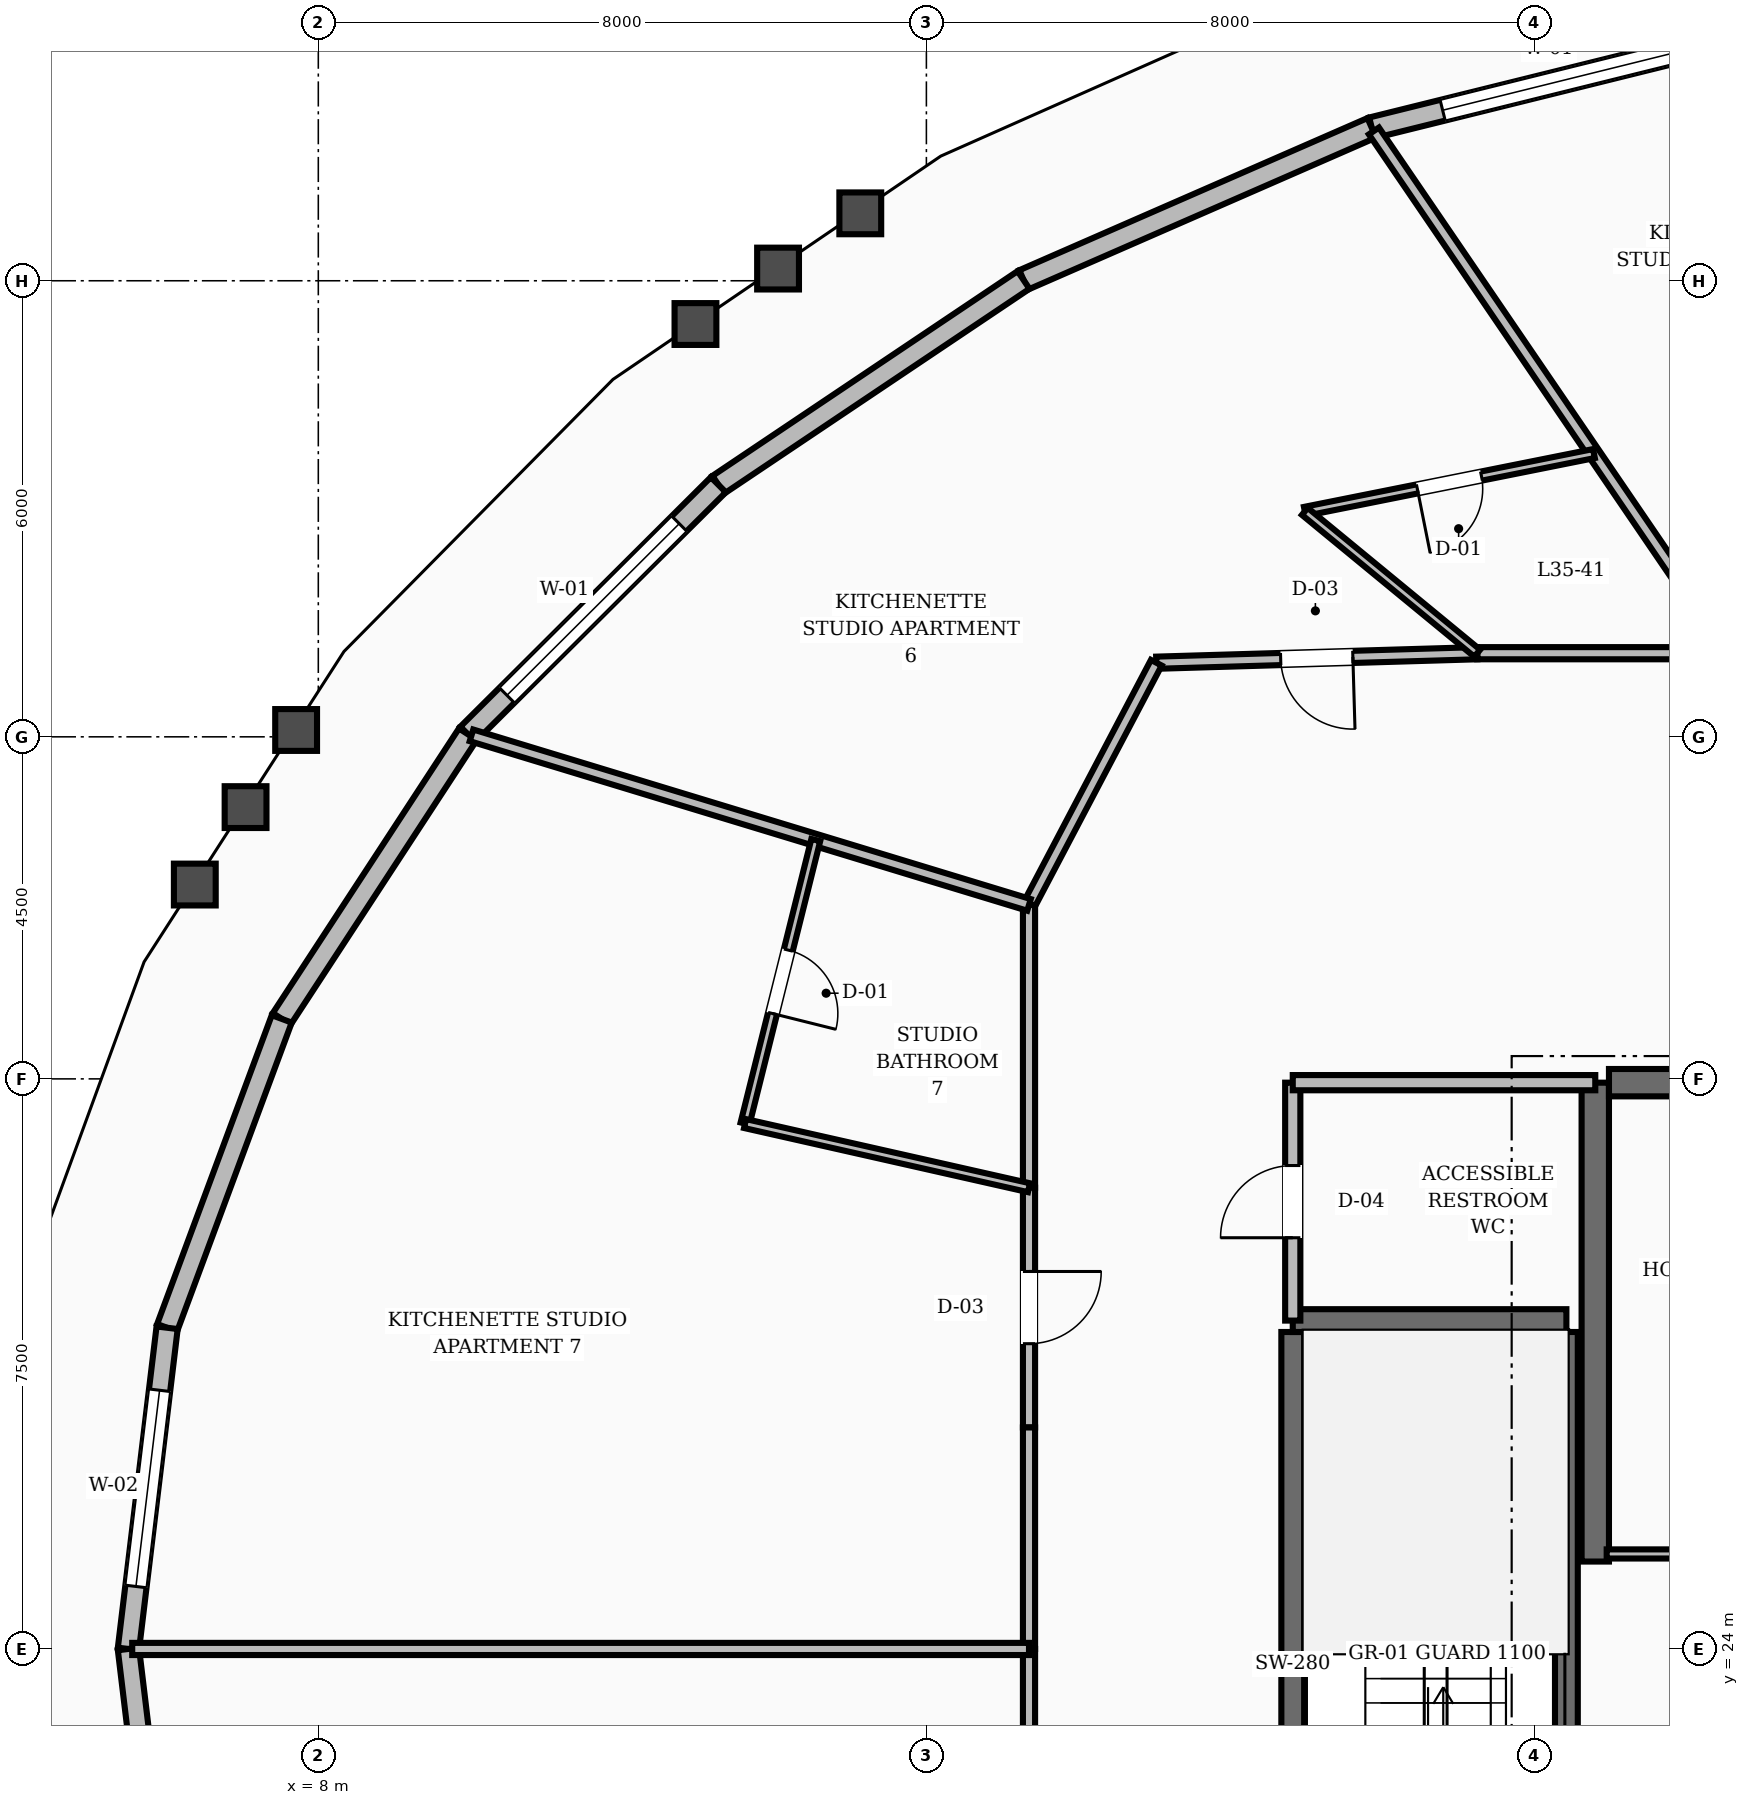
"""IFC4 building model, lengths in metres.
Left out: names, types, materials, properties, quantities, classifications, styles, units other than length and angle.
Written with IfcOpenShell. Run it as: python <this file> out.ifc"""

import sys

from ifc_helpers import new_model, si_unit, direction, frame, frame_2d, origin, place, context, subcontext, project, spatial, rectangle, extrude, element, fill, save


model = new_model("IFC4")
c1 = context("Model", 3, precision=1e-05, world=origin(), true_north=direction((0.0, 1.0)))
c2 = subcontext(c1, "Body", "Model", "MODEL_VIEW")
j1 = project(units=[si_unit("LENGTHUNIT", "METRE"), si_unit("PLANEANGLEUNIT", "RADIAN")], contexts=[c1])
p1 = place(None, origin())
s1 = spatial("IfcSite", under=j1, at=p1, CompositionType="ELEMENT")
p2 = place(p1, origin())
s2 = spatial("IfcBuilding", under=s1, at=p2, CompositionType="ELEMENT")
p3 = place(p2, frame((0.0, 0.0, 138.8)))
s3 = spatial("IfcBuildingStorey", under=s2, at=p3, CompositionType="ELEMENT", Elevation=138.8)
p4 = place(p3, frame((24.8, 25.15, 0.0), z_axis=(0.0, 0.0, 1.0), x_axis=(0.0, 1.0, 0.0)))
e1 = element("IfcWall", 1, at=p4, inside=s3, PredefinedType="SHEAR", context=c2, shape_type="SweptSolid", body=[
    extrude(rectangle(XDim=6.3, YDim=0.36, at=frame_2d((3.15, 0.0))), origin(), (0.0, 0.0, 1.0), 3.6),
])
p5 = place(p3, frame((24.98, 31.45, 0.0), z_axis=(0.0, 0.0, 1.0), x_axis=(1.0, 0.0, 0.0)))
e2 = element("IfcWall", 2, at=p5, inside=s3, PredefinedType="SHEAR", context=c2, shape_type="SweptSolid", body=[
    extrude(rectangle(XDim=3.22, YDim=0.36, at=frame_2d((1.61, 0.0))), origin(), (0.0, 0.0, 1.0), 3.6),
])
for number, where, z_axis, x_axis in (
    (3, (20.82, 19.43, 0.0), (0.0, 0.0, 1.0), (0.0, 1.0, 0.0)),
    (4, (24.42, 19.43, 0.0), (0.0, 0.0, 1.0), (0.0, 1.0, 0.0)),
):
    element("IfcWall", number, at=place(p3, frame(where, z_axis=z_axis, x_axis=x_axis)), inside=s3, PredefinedType="SHEAR", context=c2, shape_type="SweptSolid", body=[
        extrude(rectangle(XDim=8.74, YDim=0.3, at=frame_2d((4.37, 0.0))), origin(), (0.0, 0.0, 1.0), 3.6),
    ])
p6 = place(p3, frame((20.82, 28.32, 0.0), z_axis=(0.0, 0.0, 1.0), x_axis=(1.0, 0.0, 0.0)))
e5 = element("IfcWall", 5, at=p6, inside=s3, PredefinedType="SHEAR", context=c2, shape_type="SweptSolid", body=[
    extrude(rectangle(XDim=3.6, YDim=0.3, at=frame_2d((1.8, 0.0))), origin(), (0.0, 0.0, 1.0), 3.6),
])
p7 = place(p3, frame((26.83, 45.245, 0.0), z_axis=(0.0, 0.0, 1.0), x_axis=(-0.970600650036, -0.240695613066, 0.0)))
e6 = element("IfcWall", 6, at=p7, inside=s3, PredefinedType="STANDARD", context=c2, shape_type="SweptSolid", body=[
    extrude(rectangle(XDim=5.121, YDim=0.28, at=frame_2d((2.561, 0.0))), origin(), (0.0, 0.0, 1.0), 2.82),
])
p8 = place(p7, frame((0.961, 0.0, 0.8)))
e7 = element("IfcOpeningElement", 7, at=p8, cuts=e6, PredefinedType="OPENING", context=c2, shape_type="SweptSolid", body=[
    extrude(rectangle(XDim=3.2, YDim=1.65, at=frame_2d((1.6, 0.825))), frame((0.0, 0.15, 0.0), z_axis=(0.0, -1.0, 0.0), x_axis=(1.0, 0.0, 0.0)), (0.0, 0.0, 1.0), 0.3),
])
p9 = place(p3, frame((21.86, 44.012, 0.0), z_axis=(0.0, 0.0, 1.0), x_axis=(-0.916348879192, -0.400380733307, 0.0)))
e8 = element("IfcWall", 8, at=p9, inside=s3, PredefinedType="STANDARD", context=c2, shape_type="SweptSolid", body=[
    extrude(rectangle(XDim=5.0, YDim=0.28, at=frame_2d((2.5, 0.0))), origin(), (0.0, 0.0, 1.0), 2.82),
])
p10 = place(p3, frame((17.278, 42.01, 0.0), z_axis=(0.0, 0.0, 1.0), x_axis=(-0.830431041812, -0.557121427334, 0.0)))
e9 = element("IfcWall", 9, at=p10, inside=s3, PredefinedType="STANDARD", context=c2, shape_type="SweptSolid", body=[
    extrude(rectangle(XDim=4.835, YDim=0.28, at=frame_2d((2.417, 0.0))), origin(), (0.0, 0.0, 1.0), 2.82),
])
p11 = place(p3, frame((13.263, 39.316, 0.0), z_axis=(0.0, 0.0, 1.0), x_axis=(-0.708522616078, -0.705688105686, 0.0)))
e10 = element("IfcWall", 10, at=p11, inside=s3, PredefinedType="STANDARD", context=c2, shape_type="SweptSolid", body=[
    extrude(rectangle(XDim=4.651, YDim=0.28, at=frame_2d((2.326, 0.0))), origin(), (0.0, 0.0, 1.0), 2.82),
])
p12 = place(p11, frame((0.726, 0.0, 0.8)))
e11 = element("IfcOpeningElement", 11, at=p12, cuts=e10, PredefinedType="OPENING", context=c2, shape_type="SweptSolid", body=[
    extrude(rectangle(XDim=3.2, YDim=1.65, at=frame_2d((1.6, 0.825))), frame((0.0, 0.15, 0.0), z_axis=(0.0, -1.0, 0.0), x_axis=(1.0, 0.0, 0.0)), (0.0, 0.0, 1.0), 0.3),
])
p13 = place(p3, frame((9.968, 36.034, 0.0), z_axis=(0.0, 0.0, 1.0), x_axis=(-0.54727435463, -0.836953272749, 0.0)))
e12 = element("IfcWall", 12, at=p13, inside=s3, PredefinedType="STANDARD", context=c2, shape_type="SweptSolid", body=[
    extrude(rectangle(XDim=4.474, YDim=0.28, at=frame_2d((2.237, 0.0))), origin(), (0.0, 0.0, 1.0), 2.82),
])
p14 = place(p3, frame((7.519, 32.289, 0.0), z_axis=(0.0, 0.0, 1.0), x_axis=(-0.347886684165, -0.937536588609, 0.0)))
e13 = element("IfcWall", 13, at=p14, inside=s3, PredefinedType="STANDARD", context=c2, shape_type="SweptSolid", body=[
    extrude(rectangle(XDim=4.334, YDim=0.28, at=frame_2d((2.167, 0.0))), origin(), (0.0, 0.0, 1.0), 2.82),
])
p15 = place(p3, frame((6.011, 28.226, 0.0), z_axis=(0.0, 0.0, 1.0), x_axis=(-0.119649579006, -0.992816185527, 0.0)))
e14 = element("IfcWall", 14, at=p15, inside=s3, PredefinedType="STANDARD", context=c2, shape_type="SweptSolid", body=[
    extrude(rectangle(XDim=4.256, YDim=0.28, at=frame_2d((2.128, 0.0))), origin(), (0.0, 0.0, 1.0), 2.82),
])
p16 = place(p15, frame((0.828, 0.0, 0.8)))
e15 = element("IfcOpeningElement", 15, at=p16, cuts=e14, PredefinedType="OPENING", context=c2, shape_type="SweptSolid", body=[
    extrude(rectangle(XDim=2.6, YDim=1.65, at=frame_2d((1.3, 0.825))), frame((0.0, 0.15, 0.0), z_axis=(0.0, -1.0, 0.0), x_axis=(1.0, 0.0, 0.0)), (0.0, 0.0, 1.0), 0.3),
])
p17 = place(p3, frame((5.502, 24.0, 0.0), z_axis=(0.0, 0.0, 1.0), x_axis=(0.119649579006, -0.992816185527, 0.0)))
e16 = element("IfcWall", 16, at=p17, inside=s3, PredefinedType="STANDARD", context=c2, shape_type="SweptSolid", body=[
    extrude(rectangle(XDim=4.256, YDim=0.28, at=frame_2d((2.128, 0.0))), origin(), (0.0, 0.0, 1.0), 2.82),
])
p18 = place(p3, frame((20.82, 28.32, 0.0), z_axis=(0.0, 0.0, 1.0), x_axis=(0.0, 1.0, 0.0)))
e17 = element("IfcWall", 17, at=p18, inside=s3, PredefinedType="SOLIDWALL", context=c2, shape_type="SweptSolid", body=[
    extrude(rectangle(XDim=3.13, YDim=0.2, at=frame_2d((1.565, 0.0))), origin(), (0.0, 0.0, 1.0), 2.8),
])
p19 = place(p18, frame((1.09, 0.0, 0.0)))
e18 = element("IfcOpeningElement", 18, at=p19, cuts=e17, PredefinedType="OPENING", context=c2, shape_type="SweptSolid", body=[
    extrude(rectangle(XDim=0.95, YDim=2.1, at=frame_2d((0.475, 1.05))), frame((0.0, 0.11, 0.0), z_axis=(0.0, -1.0, 0.0), x_axis=(1.0, 0.0, 0.0)), (0.0, 0.0, 1.0), 0.22),
])
p20 = place(p3, frame((20.82, 31.45, 0.0), z_axis=(0.0, 0.0, 1.0), x_axis=(1.0, 0.0, 0.0)))
e19 = element("IfcWall", 19, at=p20, inside=s3, PredefinedType="SOLIDWALL", context=c2, shape_type="SweptSolid", body=[
    extrude(rectangle(XDim=3.98, YDim=0.2, at=frame_2d((1.99, 0.0))), origin(), (0.0, 0.0, 1.0), 2.8),
])
p21 = place(p3, frame((24.95, 25.25, 0.0), z_axis=(0.0, 0.0, 1.0), x_axis=(1.0, 0.0, 0.0)))
e20 = element("IfcWall", 20, at=p21, inside=s3, PredefinedType="PARTITIONING", context=c2, shape_type="SweptSolid", body=[
    extrude(rectangle(XDim=3.2, YDim=0.12, at=frame_2d((1.6, 0.0))), origin(), (0.0, 0.0, 1.0), 2.8),
])
p22 = place(p21, frame((1.125, 0.0, 0.0)))
e21 = element("IfcOpeningElement", 21, at=p22, cuts=e20, PredefinedType="OPENING", context=c2, shape_type="SweptSolid", body=[
    extrude(rectangle(XDim=0.95, YDim=2.1, at=frame_2d((0.475, 1.05))), frame((0.0, 0.07, 0.0), z_axis=(0.0, -1.0, 0.0), x_axis=(1.0, 0.0, 0.0)), (0.0, 0.0, 1.0), 0.14),
])
p23 = place(p3, frame((26.574, 37.1, 0.0), z_axis=(0.0, 0.0, 1.0), x_axis=(-1.0, 0.0, 0.0)))
e22 = element("IfcWall", 22, at=p23, inside=s3, PredefinedType="SOLIDWALL", context=c2, shape_type="SweptSolid", body=[
    extrude(rectangle(XDim=3.327, YDim=0.16, at=frame_2d((1.664, 0.0))), origin(), (0.0, 0.0, 1.0), 2.8),
])
p24 = place(p3, frame((23.247, 37.1, 0.0), z_axis=(0.0, 0.0, 1.0), x_axis=(-0.999561990195, -0.029594387265, 0.0)))
e23 = element("IfcWall", 23, at=p24, inside=s3, PredefinedType="SOLIDWALL", context=c2, shape_type="SweptSolid", body=[
    extrude(rectangle(XDim=4.224, YDim=0.16, at=frame_2d((2.112, 0.0))), origin(), (0.0, 0.0, 1.0), 2.8),
])
p25 = place(p24, frame((1.637, 0.0, 0.0)))
e24 = element("IfcOpeningElement", 24, at=p25, cuts=e23, PredefinedType="OPENING", context=c2, shape_type="SweptSolid", body=[
    extrude(rectangle(XDim=0.95, YDim=2.1, at=frame_2d((0.475, 1.05))), frame((0.0, 0.09, 0.0), z_axis=(0.0, -1.0, 0.0), x_axis=(1.0, 0.0, 0.0)), (0.0, 0.0, 1.0), 0.18),
])
p26 = place(p3, frame((19.025, 36.975, 0.0), z_axis=(0.0, 0.0, 1.0), x_axis=(-0.46527115782, -0.885168204185, 0.0)))
e25 = element("IfcWall", 25, at=p26, inside=s3, PredefinedType="SOLIDWALL", context=c2, shape_type="SweptSolid", body=[
    extrude(rectangle(XDim=3.6, YDim=0.16, at=frame_2d((1.8, 0.0))), origin(), (0.0, 0.0, 1.0), 2.8),
])
p27 = place(p3, frame((17.35, 33.789, 0.0), z_axis=(0.0, 0.0, 1.0), x_axis=(0.0, -1.0, 0.0)))
e26 = element("IfcWall", 26, at=p27, inside=s3, PredefinedType="SOLIDWALL", context=c2, shape_type="SweptSolid", body=[
    extrude(rectangle(XDim=3.721, YDim=0.16, at=frame_2d((1.86, 0.0))), origin(), (0.0, 0.0, 1.0), 2.8),
])
p28 = place(p3, frame((17.35, 30.068, 0.0), z_axis=(0.0, 0.0, 1.0), x_axis=(0.0, -1.0, 0.0)))
e27 = element("IfcWall", 27, at=p28, inside=s3, PredefinedType="SOLIDWALL", context=c2, shape_type="SweptSolid", body=[
    extrude(rectangle(XDim=3.154, YDim=0.16, at=frame_2d((1.577, 0.0))), origin(), (0.0, 0.0, 1.0), 2.8),
])
p29 = place(p28, frame((1.102, 0.0, 0.0)))
e28 = element("IfcOpeningElement", 28, at=p29, cuts=e27, PredefinedType="OPENING", context=c2, shape_type="SweptSolid", body=[
    extrude(rectangle(XDim=0.95, YDim=2.1, at=frame_2d((0.475, 1.05))), frame((0.0, 0.09, 0.0), z_axis=(0.0, -1.0, 0.0), x_axis=(1.0, 0.0, 0.0)), (0.0, 0.0, 1.0), 0.18),
])
for number, where, z_axis, x_axis in (
    (29, (17.35, 26.914, 0.0), (0.0, 0.0, 1.0), (0.0, -1.0, 0.0)),
    (30, (17.35, 24.0, 0.0), (0.0, 0.0, 1.0), (0.0, -1.0, 0.0)),
):
    element("IfcWall", number, at=place(p3, frame(where, z_axis=z_axis, x_axis=x_axis)), inside=s3, PredefinedType="SOLIDWALL", context=c2, shape_type="SweptSolid", body=[
        extrude(rectangle(XDim=2.914, YDim=0.16, at=frame_2d((1.457, 0.0))), origin(), (0.0, 0.0, 1.0), 2.8),
    ])
p30 = place(p3, frame((26.574, 37.1, 0.0), z_axis=(0.0, 0.0, 1.0), x_axis=(-0.563462523852, 0.826141624792, 0.0)))
e31 = element("IfcWall", 31, at=p30, inside=s3, PredefinedType="SOLIDWALL", context=c2, shape_type="SweptSolid", body=[
    extrude(rectangle(XDim=8.316, YDim=0.16, at=frame_2d((4.158, 0.0))), origin(), (0.0, 0.0, 1.0), 2.8),
])
p31 = place(p3, frame((24.782, 39.727, 0.0), z_axis=(0.0, 0.0, 1.0), x_axis=(-0.980580675691, -0.196116135138, 0.0)))
e32 = element("IfcWall", 32, at=p31, inside=s3, PredefinedType="PARTITIONING", context=c2, shape_type="SweptSolid", body=[
    extrude(rectangle(XDim=3.879, YDim=0.12, at=frame_2d((1.939, 0.0))), origin(), (0.0, 0.0, 1.0), 2.8),
])
p32 = place(p31, frame((1.51, 0.0, 0.0)))
e33 = element("IfcOpeningElement", 33, at=p32, cuts=e32, PredefinedType="OPENING", context=c2, shape_type="SweptSolid", body=[
    extrude(rectangle(XDim=0.86, YDim=2.1, at=frame_2d((0.43, 1.05))), frame((0.0, 0.07, 0.0), z_axis=(0.0, -1.0, 0.0), x_axis=(1.0, 0.0, 0.0)), (0.0, 0.0, 1.0), 0.14),
])
p33 = place(p3, frame((23.247, 37.1, 0.0), z_axis=(0.0, 0.0, 1.0), x_axis=(-0.772280465458, 0.63528173488, 0.0)))
e34 = element("IfcWall", 34, at=p33, inside=s3, PredefinedType="PARTITIONING", context=c2, shape_type="SweptSolid", body=[
    extrude(rectangle(XDim=2.937, YDim=0.12, at=frame_2d((1.468, 0.0))), origin(), (0.0, 0.0, 1.0), 2.8),
])
p34 = place(p3, frame((17.35, 33.789, 0.0), z_axis=(0.0, 0.0, 1.0), x_axis=(-0.956731712207, 0.290971529289, 0.0)))
e35 = element("IfcWall", 35, at=p34, inside=s3, PredefinedType="SOLIDWALL", context=c2, shape_type="SweptSolid", body=[
    extrude(rectangle(XDim=7.667, YDim=0.16, at=frame_2d((3.833, 0.0))), origin(), (0.0, 0.0, 1.0), 2.8),
])
p35 = place(p3, frame((14.545, 34.642, 0.0), z_axis=(0.0, 0.0, 1.0), x_axis=(-0.242087316969, -0.970254467118, 0.0)))
e36 = element("IfcWall", 36, at=p35, inside=s3, PredefinedType="PARTITIONING", context=c2, shape_type="SweptSolid", body=[
    extrude(rectangle(XDim=3.844, YDim=0.12, at=frame_2d((1.922, 0.0))), origin(), (0.0, 0.0, 1.0), 2.8),
])
p36 = place(p35, frame((1.492, 0.0, 0.0)))
e37 = element("IfcOpeningElement", 37, at=p36, cuts=e36, PredefinedType="OPENING", context=c2, shape_type="SweptSolid", body=[
    extrude(rectangle(XDim=0.86, YDim=2.1, at=frame_2d((0.43, 1.05))), frame((0.0, 0.07, 0.0), z_axis=(0.0, -1.0, 0.0), x_axis=(1.0, 0.0, 0.0)), (0.0, 0.0, 1.0), 0.14),
])
p37 = place(p3, frame((17.35, 30.068, 0.0), z_axis=(0.0, 0.0, 1.0), x_axis=(-0.975420676692, 0.220350864492, 0.0)))
e38 = element("IfcWall", 38, at=p37, inside=s3, PredefinedType="PARTITIONING", context=c2, shape_type="SweptSolid", body=[
    extrude(rectangle(XDim=3.83, YDim=0.12, at=frame_2d((1.915, 0.0))), origin(), (0.0, 0.0, 1.0), 2.8),
])
p38 = place(p3, frame((17.35, 24.0, 0.0), z_axis=(0.0, 0.0, 1.0), x_axis=(-1.0, 0.0, 0.0)))
e39 = element("IfcWall", 39, at=p38, inside=s3, PredefinedType="SOLIDWALL", context=c2, shape_type="SweptSolid", body=[
    extrude(rectangle(XDim=11.798, YDim=0.16, at=frame_2d((5.899, 0.0))), origin(), (0.0, 0.0, 1.0), 2.8),
])
p39 = place(p8, origin())
e40 = element("IfcWindow", 40, at=p39, inside=s3, PartitioningType="SINGLE_PANEL", PredefinedType="WINDOW", context=c2, shape_type="SweptSolid", body=[
    extrude(rectangle(XDim=3.2, YDim=1.65, at=frame_2d((1.6, 0.825))), frame((0.0, 0.03, 0.0), z_axis=(0.0, -1.0, 0.0), x_axis=(1.0, 0.0, 0.0)), (0.0, 0.0, 1.0), 0.06),
])
fill(e7, e40)
p40 = place(p12, origin())
e41 = element("IfcWindow", 41, at=p40, inside=s3, PartitioningType="SINGLE_PANEL", PredefinedType="WINDOW", context=c2, shape_type="SweptSolid", body=[
    extrude(rectangle(XDim=3.2, YDim=1.65, at=frame_2d((1.6, 0.825))), frame((0.0, 0.03, 0.0), z_axis=(0.0, -1.0, 0.0), x_axis=(1.0, 0.0, 0.0)), (0.0, 0.0, 1.0), 0.06),
])
fill(e11, e41)
p41 = place(p16, origin())
e42 = element("IfcWindow", 42, at=p41, inside=s3, PartitioningType="SINGLE_PANEL", PredefinedType="WINDOW", context=c2, shape_type="SweptSolid", body=[
    extrude(rectangle(XDim=2.6, YDim=1.65, at=frame_2d((1.3, 0.825))), frame((0.0, 0.03, 0.0), z_axis=(0.0, -1.0, 0.0), x_axis=(1.0, 0.0, 0.0)), (0.0, 0.0, 1.0), 0.06),
])
fill(e15, e42)
p42 = place(p19, origin())
e43 = element("IfcDoor", 43, at=p42, inside=s3, OperationType="SINGLE_SWING_LEFT", PredefinedType="DOOR", context=c2, shape_type="SweptSolid", body=[
    extrude(rectangle(XDim=0.95, YDim=2.1, at=frame_2d((0.475, 1.05))), frame((0.0, 0.025, 0.0), z_axis=(0.0, -1.0, 0.0), x_axis=(1.0, 0.0, 0.0)), (0.0, 0.0, 1.0), 0.05),
])
fill(e18, e43)
p43 = place(p32, origin())
e44 = element("IfcDoor", 44, at=p43, inside=s3, OperationType="SINGLE_SWING_RIGHT", PredefinedType="DOOR", context=c2, shape_type="SweptSolid", body=[
    extrude(rectangle(XDim=0.86, YDim=2.1, at=frame_2d((0.43, 1.05))), frame((0.0, 0.025, 0.0), z_axis=(0.0, -1.0, 0.0), x_axis=(1.0, 0.0, 0.0)), (0.0, 0.0, 1.0), 0.05),
])
fill(e33, e44)
p44 = place(p25, origin())
e45 = element("IfcDoor", 45, at=p44, inside=s3, OperationType="SINGLE_SWING_LEFT", PredefinedType="DOOR", context=c2, shape_type="SweptSolid", body=[
    extrude(rectangle(XDim=0.95, YDim=2.1, at=frame_2d((0.475, 1.05))), frame((0.0, 0.025, 0.0), z_axis=(0.0, -1.0, 0.0), x_axis=(1.0, 0.0, 0.0)), (0.0, 0.0, 1.0), 0.05),
])
fill(e24, e45)
p45 = place(p36, origin())
e46 = element("IfcDoor", 46, at=p45, inside=s3, OperationType="SINGLE_SWING_RIGHT", PredefinedType="DOOR", context=c2, shape_type="SweptSolid", body=[
    extrude(rectangle(XDim=0.86, YDim=2.1, at=frame_2d((0.43, 1.05))), frame((0.0, 0.025, 0.0), z_axis=(0.0, -1.0, 0.0), x_axis=(1.0, 0.0, 0.0)), (0.0, 0.0, 1.0), 0.05),
])
fill(e37, e46)
p46 = place(p29, origin())
e47 = element("IfcDoor", 47, at=p46, inside=s3, OperationType="SINGLE_SWING_LEFT", PredefinedType="DOOR", context=c2, shape_type="SweptSolid", body=[
    extrude(rectangle(XDim=0.95, YDim=2.1, at=frame_2d((0.475, 1.05))), frame((0.0, 0.025, 0.0), z_axis=(0.0, -1.0, 0.0), x_axis=(1.0, 0.0, 0.0)), (0.0, 0.0, 1.0), 0.05),
])
fill(e28, e47)
save(model, sys.argv[1])
